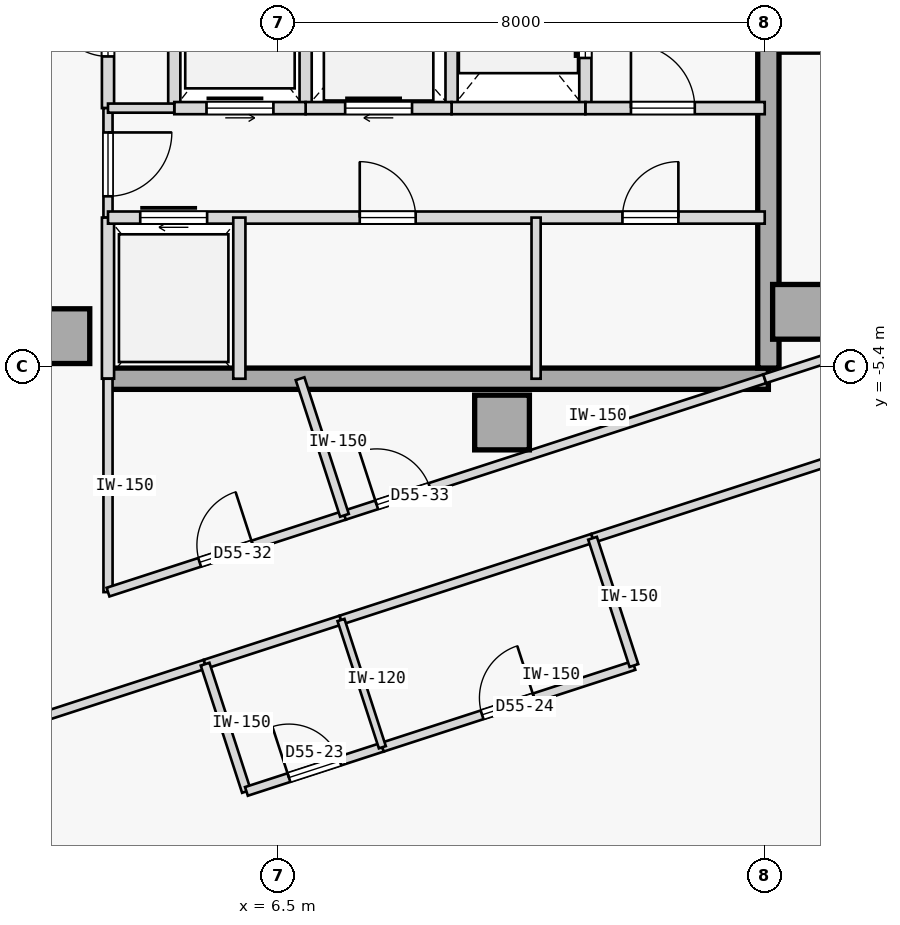
"""IFC4 building model, lengths in metres.
Left out: names, types, materials, properties, quantities, classifications, styles, units other than length and angle.
Written with IfcOpenShell. Run it as: python <this file> out.ifc"""

import sys

from ifc_helpers import new_model, si_unit, direction, frame, frame_2d, origin, origin_2d, place, context, subcontext, project, spatial, rectangle, extrude, element, fill, save


model = new_model("IFC4")
c1 = context("Model", 3, precision=1e-05, world=origin(), true_north=direction((0.0, 1.0)))
c2 = subcontext(c1, "Body", "Model", "MODEL_VIEW")
j1 = project(units=[si_unit("LENGTHUNIT", "METRE"), si_unit("PLANEANGLEUNIT", "RADIAN")], contexts=[c1])
p1 = place(None, origin())
s1 = spatial("IfcSite", under=j1, at=p1, CompositionType="ELEMENT")
p2 = place(p1, origin())
s2 = spatial("IfcBuilding", under=s1, at=p2, CompositionType="ELEMENT")
p3 = place(p2, frame((0.0, 0.0, 210.9)))
s3 = spatial("IfcBuildingStorey", under=s2, at=p3, CompositionType="ELEMENT", Elevation=210.9)
for number, where, z_axis, x_axis in (
    (1, (15.08, -4.5, 0.0), (0.0, 0.0, 1.0), (1.0, 0.0, 0.0)),
    (2, (10.18, -6.32, 0.0), (0.0, 0.0, 1.0), (1.0, 0.0, 0.0)),
    (3, (2.95, -4.9, 0.0), (0.0, 0.0, 1.0), (1.0, 0.0, 0.0)),
):
    element("IfcColumn", number, at=place(p3, frame(where, z_axis=z_axis, x_axis=x_axis)), inside=s3, PredefinedType="COLUMN", context=c2, shape_type="SweptSolid", body=[
        extrude(rectangle(XDim=0.9, YDim=0.9, at=origin_2d()), origin(), (0.0, 0.0, 1.0), 3.35),
    ])
p4 = place(p3, frame((3.7, -5.6, 0.0), z_axis=(0.0, 0.0, 1.0), x_axis=(1.0, 0.0, 0.0)))
e4 = element("IfcWall", 4, at=p4, inside=s3, PredefinedType="SHEAR", context=c2, shape_type="SweptSolid", body=[
    extrude(rectangle(XDim=10.86, YDim=0.35, at=frame_2d((5.43, 0.0))), origin(), (0.0, 0.0, 1.0), 3.125),
])
p5 = place(p3, frame((14.56, -5.425, 0.0), z_axis=(0.0, 0.0, 1.0), x_axis=(0.0, 1.0, 0.0)))
e5 = element("IfcWall", 5, at=p5, inside=s3, PredefinedType="SHEAR", context=c2, shape_type="SweptSolid", body=[
    extrude(rectangle(XDim=10.85, YDim=0.35, at=frame_2d((5.425, 0.0))), origin(), (0.0, 0.0, 1.0), 3.125),
])
p6 = place(p3, frame((3.7, -1.15, 0.0), z_axis=(0.0, 0.0, 1.0), x_axis=(0.0, 1.0, 0.0)))
e6 = element("IfcWall", 6, at=p6, inside=s3, PredefinedType="STANDARD", context=c2, shape_type="SweptSolid", body=[
    extrude(rectangle(XDim=6.75, YDim=0.2, at=frame_2d((3.375, 0.0))), origin(), (0.0, 0.0, 1.0), 3.125),
])
p7 = place(p6, frame((3.6, 0.0, 0.0)))
e7 = element("IfcOpeningElement", 7, at=p7, cuts=e6, PredefinedType="OPENING", context=c2, shape_type="SweptSolid", body=[
    extrude(rectangle(XDim=0.92, YDim=2.15, at=frame_2d((0.46, 1.075))), frame((0.0, 0.11, 0.0), z_axis=(0.0, -1.0, 0.0), x_axis=(1.0, 0.0, 0.0)), (0.0, 0.0, 1.0), 0.22),
])
p8 = place(p6, frame((0.85, 0.0, 0.0)))
e8 = element("IfcOpeningElement", 8, at=p8, cuts=e6, PredefinedType="OPENING", context=c2, shape_type="SweptSolid", body=[
    extrude(rectangle(XDim=0.9, YDim=2.15, at=frame_2d((0.45, 1.075))), frame((0.0, 0.11, 0.0), z_axis=(0.0, -1.0, 0.0), x_axis=(1.0, 0.0, 0.0)), (0.0, 0.0, 1.0), 0.22),
])
p9 = place(p3, frame((3.7, -2.95, 0.0), z_axis=(0.0, 0.0, 1.0), x_axis=(0.0, 1.0, 0.0)))
e9 = element("IfcWall", 9, at=p9, inside=s3, PredefinedType="PARTITIONING", context=c2, shape_type="SweptSolid", body=[
    extrude(rectangle(XDim=1.8, YDim=0.15, at=frame_2d((0.9, 0.0))), origin(), (0.0, 0.0, 1.0), 3.125),
])
p10 = place(p9, frame((0.35, 0.0, 0.0)))
e10 = element("IfcOpeningElement", 10, at=p10, cuts=e9, PredefinedType="OPENING", context=c2, shape_type="SweptSolid", body=[
    extrude(rectangle(XDim=1.05, YDim=2.18, at=frame_2d((0.525, 1.09))), frame((0.0, 0.085, 0.0), z_axis=(0.0, -1.0, 0.0), x_axis=(1.0, 0.0, 0.0)), (0.0, 0.0, 1.0), 0.17),
])
p11 = place(p3, frame((3.7, -5.6, 0.0), z_axis=(0.0, 0.0, 1.0), x_axis=(0.0, 1.0, 0.0)))
e11 = element("IfcWall", 11, at=p11, inside=s3, PredefinedType="STANDARD", context=c2, shape_type="SweptSolid", body=[
    extrude(rectangle(XDim=2.65, YDim=0.2, at=frame_2d((1.325, 0.0))), origin(), (0.0, 0.0, 1.0), 3.125),
])
p12 = place(p3, frame((11.55, -1.15, 0.0), z_axis=(0.0, 0.0, 1.0), x_axis=(0.0, 1.0, 0.0)))
e12 = element("IfcWall", 12, at=p12, inside=s3, PredefinedType="STANDARD", context=c2, shape_type="SweptSolid", body=[
    extrude(rectangle(XDim=2.75, YDim=0.2, at=frame_2d((1.375, 0.0))), origin(), (0.0, 0.0, 1.0), 3.125),
])
p13 = place(p12, frame((0.825, 0.0, 0.0)))
e13 = element("IfcOpeningElement", 13, at=p13, cuts=e12, PredefinedType="OPENING", context=c2, shape_type="SweptSolid", body=[
    extrude(rectangle(XDim=1.1, YDim=2.15, at=frame_2d((0.55, 1.075))), frame((0.0, 0.11, 0.0), z_axis=(0.0, -1.0, 0.0), x_axis=(1.0, 0.0, 0.0)), (0.0, 0.0, 1.0), 0.22),
])
p14 = place(p3, frame((9.35, -1.15, 0.0), z_axis=(0.0, 0.0, 1.0), x_axis=(0.0, 1.0, 0.0)))
e14 = element("IfcWall", 14, at=p14, inside=s3, PredefinedType="STANDARD", context=c2, shape_type="SweptSolid", body=[
    extrude(rectangle(XDim=2.75, YDim=0.2, at=frame_2d((1.375, 0.0))), origin(), (0.0, 0.0, 1.0), 3.125),
])
p15 = place(p3, frame((11.55, -1.15, 0.0), z_axis=(0.0, 0.0, 1.0), x_axis=(1.0, 0.0, 0.0)))
e15 = element("IfcWall", 15, at=p15, inside=s3, PredefinedType="STANDARD", context=c2, shape_type="SweptSolid", body=[
    extrude(rectangle(XDim=2.95, YDim=0.2, at=frame_2d((1.475, 0.0))), origin(), (0.0, 0.0, 1.0), 3.125),
])
p16 = place(p15, frame((0.75, 0.0, 0.0)))
e16 = element("IfcOpeningElement", 16, at=p16, cuts=e15, PredefinedType="OPENING", context=c2, shape_type="SweptSolid", body=[
    extrude(rectangle(XDim=1.05, YDim=2.18, at=frame_2d((0.525, 1.09))), frame((0.0, 0.11, 0.0), z_axis=(0.0, -1.0, 0.0), x_axis=(1.0, 0.0, 0.0)), (0.0, 0.0, 1.0), 0.22),
])
p17 = place(p3, frame((9.35, -1.15, 0.0), z_axis=(0.0, 0.0, 1.0), x_axis=(1.0, 0.0, 0.0)))
e17 = element("IfcWall", 17, at=p17, inside=s3, PredefinedType="STANDARD", context=c2, shape_type="SweptSolid", body=[
    extrude(rectangle(XDim=2.2, YDim=0.2, at=frame_2d((1.1, 0.0))), origin(), (0.0, 0.0, 1.0), 3.125),
])
p18 = place(p3, frame((6.95, -1.15, 0.0), z_axis=(0.0, 0.0, 1.0), x_axis=(0.0, 1.0, 0.0)))
e18 = element("IfcWall", 18, at=p18, inside=s3, PredefinedType="STANDARD", context=c2, shape_type="SweptSolid", body=[
    extrude(rectangle(XDim=2.75, YDim=0.2, at=frame_2d((1.375, 0.0))), origin(), (0.0, 0.0, 1.0), 3.125),
])
p19 = place(p3, frame((6.95, -1.15, 0.0), z_axis=(0.0, 0.0, 1.0), x_axis=(1.0, 0.0, 0.0)))
e19 = element("IfcWall", 19, at=p19, inside=s3, PredefinedType="STANDARD", context=c2, shape_type="SweptSolid", body=[
    extrude(rectangle(XDim=2.4, YDim=0.2, at=frame_2d((1.2, 0.0))), origin(), (0.0, 0.0, 1.0), 3.125),
])
p20 = place(p19, frame((0.65, 0.0, 0.0)))
e20 = element("IfcOpeningElement", 20, at=p20, cuts=e19, PredefinedType="OPENING", context=c2, shape_type="SweptSolid", body=[
    extrude(rectangle(XDim=1.1, YDim=2.15, at=frame_2d((0.55, 1.075))), frame((0.0, 0.11, 0.0), z_axis=(0.0, -1.0, 0.0), x_axis=(1.0, 0.0, 0.0)), (0.0, 0.0, 1.0), 0.22),
])
p21 = place(p3, frame((4.79, -1.15, 0.0), z_axis=(0.0, 0.0, 1.0), x_axis=(0.0, 1.0, 0.0)))
e21 = element("IfcWall", 21, at=p21, inside=s3, PredefinedType="STANDARD", context=c2, shape_type="SweptSolid", body=[
    extrude(rectangle(XDim=2.75, YDim=0.2, at=frame_2d((1.375, 0.0))), origin(), (0.0, 0.0, 1.0), 3.125),
])
p22 = place(p3, frame((4.79, -1.15, 0.0), z_axis=(0.0, 0.0, 1.0), x_axis=(1.0, 0.0, 0.0)))
e22 = element("IfcWall", 22, at=p22, inside=s3, PredefinedType="STANDARD", context=c2, shape_type="SweptSolid", body=[
    extrude(rectangle(XDim=2.16, YDim=0.2, at=frame_2d((1.08, 0.0))), origin(), (0.0, 0.0, 1.0), 3.125),
])
p23 = place(p22, frame((0.53, 0.0, 0.0)))
e23 = element("IfcOpeningElement", 23, at=p23, cuts=e22, PredefinedType="OPENING", context=c2, shape_type="SweptSolid", body=[
    extrude(rectangle(XDim=1.1, YDim=2.15, at=frame_2d((0.55, 1.075))), frame((0.0, 0.11, 0.0), z_axis=(0.0, -1.0, 0.0), x_axis=(1.0, 0.0, 0.0)), (0.0, 0.0, 1.0), 0.22),
])
p24 = place(p3, frame((3.7, -1.15, 0.0), z_axis=(0.0, 0.0, 1.0), x_axis=(1.0, 0.0, 0.0)))
e24 = element("IfcWall", 24, at=p24, inside=s3, PredefinedType="PARTITIONING", context=c2, shape_type="SweptSolid", body=[
    extrude(rectangle(XDim=1.09, YDim=0.15, at=frame_2d((0.545, 0.0))), origin(), (0.0, 0.0, 1.0), 3.125),
])
p25 = place(p3, frame((3.7, -2.95, 0.0), z_axis=(0.0, 0.0, 1.0), x_axis=(1.0, 0.0, 0.0)))
e25 = element("IfcWall", 25, at=p25, inside=s3, PredefinedType="STANDARD", context=c2, shape_type="SweptSolid", body=[
    extrude(rectangle(XDim=10.8, YDim=0.2, at=frame_2d((5.4, 0.0))), origin(), (0.0, 0.0, 1.0), 3.125),
])
p26 = place(p25, frame((0.53, 0.0, 0.0)))
e26 = element("IfcOpeningElement", 26, at=p26, cuts=e25, PredefinedType="OPENING", context=c2, shape_type="SweptSolid", body=[
    extrude(rectangle(XDim=1.1, YDim=2.15, at=frame_2d((0.55, 1.075))), frame((0.0, 0.11, 0.0), z_axis=(0.0, -1.0, 0.0), x_axis=(1.0, 0.0, 0.0)), (0.0, 0.0, 1.0), 0.22),
])
p27 = place(p25, frame((4.14, 0.0, 0.0)))
e27 = element("IfcOpeningElement", 27, at=p27, cuts=e25, PredefinedType="OPENING", context=c2, shape_type="SweptSolid", body=[
    extrude(rectangle(XDim=0.92, YDim=2.15, at=frame_2d((0.46, 1.075))), frame((0.0, 0.11, 0.0), z_axis=(0.0, -1.0, 0.0), x_axis=(1.0, 0.0, 0.0)), (0.0, 0.0, 1.0), 0.22),
])
p28 = place(p25, frame((8.46, 0.0, 0.0)))
e28 = element("IfcOpeningElement", 28, at=p28, cuts=e25, PredefinedType="OPENING", context=c2, shape_type="SweptSolid", body=[
    extrude(rectangle(XDim=0.92, YDim=2.15, at=frame_2d((0.46, 1.075))), frame((0.0, 0.11, 0.0), z_axis=(0.0, -1.0, 0.0), x_axis=(1.0, 0.0, 0.0)), (0.0, 0.0, 1.0), 0.22),
])
p29 = place(p3, frame((5.86, -5.6, 0.0), z_axis=(0.0, 0.0, 1.0), x_axis=(0.0, 1.0, 0.0)))
e29 = element("IfcWall", 29, at=p29, inside=s3, PredefinedType="STANDARD", context=c2, shape_type="SweptSolid", body=[
    extrude(rectangle(XDim=2.65, YDim=0.2, at=frame_2d((1.325, 0.0))), origin(), (0.0, 0.0, 1.0), 3.125),
])
p30 = place(p3, frame((10.74, -5.6, 0.0), z_axis=(0.0, 0.0, 1.0), x_axis=(0.0, 1.0, 0.0)))
e30 = element("IfcWall", 30, at=p30, inside=s3, PredefinedType="PARTITIONING", context=c2, shape_type="SweptSolid", body=[
    extrude(rectangle(XDim=2.65, YDim=0.15, at=frame_2d((1.325, 0.0))), origin(), (0.0, 0.0, 1.0), 3.125),
])
p31 = place(p3, frame((-1.643, -12.549, 0.0), z_axis=(0.0, 0.0, 1.0), x_axis=(0.951058161173, 0.309011931914, 0.0)))
e31 = element("IfcWall", 31, at=p31, inside=s3, PredefinedType="PARTITIONING", context=c2, shape_type="SweptSolid", body=[
    extrude(rectangle(XDim=7.297, YDim=0.15, at=frame_2d((3.648, 0.0))), origin(), (0.0, 0.0, 1.0), 3.125),
])
p32 = place(p3, frame((11.669, -8.223, 0.0), z_axis=(0.0, 0.0, 1.0), x_axis=(0.951057967787, 0.309012527106, 0.0)))
e32 = element("IfcWall", 32, at=p32, inside=s3, PredefinedType="PARTITIONING", context=c2, shape_type="SweptSolid", body=[
    extrude(rectangle(XDim=19.291, YDim=0.15, at=frame_2d((9.646, 0.0))), origin(), (0.0, 0.0, 1.0), 3.125),
])
p33 = place(p32, frame((9.17, 0.0, 0.0)))
e33 = element("IfcOpeningElement", 33, at=p33, cuts=e32, PredefinedType="OPENING", context=c2, shape_type="SweptSolid", body=[
    extrude(rectangle(XDim=0.95, YDim=2.15, at=frame_2d((0.475, 1.075))), frame((0.0, 0.085, 0.0), z_axis=(0.0, -1.0, 0.0), x_axis=(1.0, 0.0, 0.0)), (0.0, 0.0, 1.0), 0.17),
])
p34 = place(p3, frame((5.297, -10.294, 0.0), z_axis=(0.0, 0.0, 1.0), x_axis=(0.951066131077, 0.308987401554, 0.0)))
e34 = element("IfcWall", 34, at=p34, inside=s3, PredefinedType="PARTITIONING", context=c2, shape_type="SweptSolid", body=[
    extrude(rectangle(XDim=2.35, YDim=0.15, at=frame_2d((1.175, 0.0))), origin(), (0.0, 0.0, 1.0), 3.125),
])
p35 = place(p3, frame((7.531, -9.568, 0.0), z_axis=(0.0, 0.0, 1.0), x_axis=(0.951041492154, 0.309063230101, 0.0)))
e35 = element("IfcWall", 35, at=p35, inside=s3, PredefinedType="PARTITIONING", context=c2, shape_type="SweptSolid", body=[
    extrude(rectangle(XDim=4.35, YDim=0.15, at=frame_2d((2.175, 0.0))), origin(), (0.0, 0.0, 1.0), 3.125),
])
p36 = place(p3, frame((3.7, -9.109, 0.0), z_axis=(0.0, 0.0, 1.0), x_axis=(-0.000139130433, 0.999999990321, 0.0)))
e36 = element("IfcWall", 36, at=p36, inside=s3, PredefinedType="PARTITIONING", context=c2, shape_type="SweptSolid", body=[
    extrude(rectangle(XDim=3.51, YDim=0.15, at=frame_2d((1.755, 0.0))), origin(), (0.0, 0.0, 1.0), 3.125),
])
p37 = place(p3, frame((3.7, -9.109, 0.0), z_axis=(0.0, 0.0, 1.0), x_axis=(0.95106259184, 0.308998295145, 0.0)))
e37 = element("IfcWall", 37, at=p37, inside=s3, PredefinedType="PARTITIONING", context=c2, shape_type="SweptSolid", body=[
    extrude(rectangle(XDim=4.088, YDim=0.15, at=frame_2d((2.044, 0.0))), origin(), (0.0, 0.0, 1.0), 3.125),
])
p38 = place(p37, frame((1.584, 0.0, 0.0)))
e38 = element("IfcOpeningElement", 38, at=p38, cuts=e37, PredefinedType="OPENING", context=c2, shape_type="SweptSolid", body=[
    extrude(rectangle(XDim=0.92, YDim=2.15, at=frame_2d((0.46, 1.075))), frame((0.0, 0.085, 0.0), z_axis=(0.0, -1.0, 0.0), x_axis=(1.0, 0.0, 0.0)), (0.0, 0.0, 1.0), 0.17),
])
p39 = place(p3, frame((7.588, -7.846, 0.0), z_axis=(0.0, 0.0, 1.0), x_axis=(0.951058013903, 0.309012385174, 0.0)))
e39 = element("IfcWall", 39, at=p39, inside=s3, PredefinedType="PARTITIONING", context=c2, shape_type="SweptSolid", body=[
    extrude(rectangle(XDim=7.267, YDim=0.15, at=frame_2d((3.634, 0.0))), origin(), (0.0, 0.0, 1.0), 3.125),
])
p40 = place(p39, frame((0.557, 0.0, 0.0)))
e40 = element("IfcOpeningElement", 40, at=p40, cuts=e39, PredefinedType="OPENING", context=c2, shape_type="SweptSolid", body=[
    extrude(rectangle(XDim=0.92, YDim=2.15, at=frame_2d((0.46, 1.075))), frame((0.0, 0.085, 0.0), z_axis=(0.0, -1.0, 0.0), x_axis=(1.0, 0.0, 0.0)), (0.0, 0.0, 1.0), 0.17),
])
p41 = place(p3, frame((14.5, -5.6, 0.0), z_axis=(0.0, 0.0, 1.0), x_axis=(0.951047546178, 0.309044600193, 0.0)))
e41 = element("IfcWall", 41, at=p41, inside=s3, PredefinedType="PARTITIONING", context=c2, shape_type="SweptSolid", body=[
    extrude(rectangle(XDim=3.461, YDim=0.15, at=frame_2d((1.73, 0.0))), origin(), (0.0, 0.0, 1.0), 3.125),
])
p42 = place(p41, frame((1.79, 0.0, 0.0)))
e42 = element("IfcOpeningElement", 42, at=p42, cuts=e41, PredefinedType="OPENING", context=c2, shape_type="SweptSolid", body=[
    extrude(rectangle(XDim=0.92, YDim=2.15, at=frame_2d((0.46, 1.075))), frame((0.0, 0.085, 0.0), z_axis=(0.0, -1.0, 0.0), x_axis=(1.0, 0.0, 0.0)), (0.0, 0.0, 1.0), 0.17),
])
p43 = place(p3, frame((5.977, -12.386, 0.0), z_axis=(0.0, 0.0, 1.0), x_axis=(-0.309060979314, 0.951042223598, 0.0)))
e43 = element("IfcWall", 43, at=p43, inside=s3, PredefinedType="PARTITIONING", context=c2, shape_type="SweptSolid", body=[
    extrude(rectangle(XDim=2.2, YDim=0.15, at=frame_2d((1.1, 0.0))), origin(), (0.0, 0.0, 1.0), 3.125),
])
p44 = place(p3, frame((5.977, -12.386, 0.0), z_axis=(0.0, 0.0, 1.0), x_axis=(0.951066131077, 0.308987401554, 0.0)))
e44 = element("IfcWall", 44, at=p44, inside=s3, PredefinedType="PARTITIONING", context=c2, shape_type="SweptSolid", body=[
    extrude(rectangle(XDim=2.35, YDim=0.15, at=frame_2d((1.175, 0.0))), origin(), (0.0, 0.0, 1.0), 3.125),
])
p45 = place(p44, frame((0.735, 0.0, 0.0)))
e45 = element("IfcOpeningElement", 45, at=p45, cuts=e44, PredefinedType="OPENING", context=c2, shape_type="SweptSolid", body=[
    extrude(rectangle(XDim=0.88, YDim=2.15, at=frame_2d((0.44, 1.075))), frame((0.0, 0.085, 0.0), z_axis=(0.0, -1.0, 0.0), x_axis=(1.0, 0.0, 0.0)), (0.0, 0.0, 1.0), 0.17),
])
p46 = place(p3, frame((8.211, -11.66, 0.0), z_axis=(0.0, 0.0, 1.0), x_axis=(0.951057987102, 0.309012467661, 0.0)))
e46 = element("IfcWall", 46, at=p46, inside=s3, PredefinedType="PARTITIONING", context=c2, shape_type="SweptSolid", body=[
    extrude(rectangle(XDim=4.35, YDim=0.15, at=frame_2d((2.175, 0.0))), origin(), (0.0, 0.0, 1.0), 3.125),
])
p47 = place(p46, frame((1.725, 0.0, 0.0)))
e47 = element("IfcOpeningElement", 47, at=p47, cuts=e46, PredefinedType="OPENING", context=c2, shape_type="SweptSolid", body=[
    extrude(rectangle(XDim=0.9, YDim=2.15, at=frame_2d((0.45, 1.075))), frame((0.0, 0.085, 0.0), z_axis=(0.0, -1.0, 0.0), x_axis=(1.0, 0.0, 0.0)), (0.0, 0.0, 1.0), 0.17),
])
p48 = place(p3, frame((12.349, -10.316, 0.0), z_axis=(0.0, 0.0, 1.0), x_axis=(-0.309028364152, 0.951052821956, 0.0)))
e48 = element("IfcWall", 48, at=p48, inside=s3, PredefinedType="PARTITIONING", context=c2, shape_type="SweptSolid", body=[
    extrude(rectangle(XDim=2.2, YDim=0.15, at=frame_2d((1.1, 0.0))), origin(), (0.0, 0.0, 1.0), 3.125),
])
p49 = place(p3, frame((8.211, -11.66, 0.0), z_axis=(0.0, 0.0, 1.0), x_axis=(-0.309060979314, 0.951042223598, 0.0)))
e49 = element("IfcWall", 49, at=p49, inside=s3, PredefinedType="PARTITIONING", context=c2, shape_type="SweptSolid", body=[
    extrude(rectangle(XDim=2.2, YDim=0.12, at=frame_2d((1.1, 0.0))), origin(), (0.0, 0.0, 1.0), 3.125),
])
p50 = place(p3, frame((7.588, -7.846, 0.0), z_axis=(0.0, 0.0, 1.0), x_axis=(-0.309055688452, 0.951043942957, 0.0)))
e50 = element("IfcWall", 50, at=p50, inside=s3, PredefinedType="PARTITIONING", context=c2, shape_type="SweptSolid", body=[
    extrude(rectangle(XDim=2.362, YDim=0.15, at=frame_2d((1.181, 0.0))), origin(), (0.0, 0.0, 1.0), 3.125),
])
p51 = place(p16, origin())
e51 = element("IfcDoor", 51, at=p51, inside=s3, OperationType="SINGLE_SWING_LEFT", PredefinedType="DOOR", context=c2, shape_type="SweptSolid", body=[
    extrude(rectangle(XDim=1.05, YDim=2.18, at=frame_2d((0.525, 1.09))), frame((0.0, 0.025, 0.0), z_axis=(0.0, -1.0, 0.0), x_axis=(1.0, 0.0, 0.0)), (0.0, 0.0, 1.0), 0.05),
])
fill(e16, e51)
p52 = place(p10, frame((1.05, 0.0, 0.0), z_axis=(0.0, 0.0, 1.0), x_axis=(-1.0, 0.0, 0.0)))
e52 = element("IfcDoor", 52, at=p52, inside=s3, OperationType="SINGLE_SWING_RIGHT", PredefinedType="DOOR", context=c2, shape_type="SweptSolid", body=[
    extrude(rectangle(XDim=1.05, YDim=2.18, at=frame_2d((0.525, 1.09))), frame((0.0, 0.025, 0.0), z_axis=(0.0, -1.0, 0.0), x_axis=(1.0, 0.0, 0.0)), (0.0, 0.0, 1.0), 0.05),
])
fill(e10, e52)
p53 = place(p13, origin())
e53 = element("IfcDoor", 53, at=p53, inside=s3, OperationType="SLIDING_TO_RIGHT", PredefinedType="DOOR", context=c2, shape_type="SweptSolid", body=[
    extrude(rectangle(XDim=1.1, YDim=2.15, at=frame_2d((0.55, 1.075))), frame((0.0, 0.025, 0.0), z_axis=(0.0, -1.0, 0.0), x_axis=(1.0, 0.0, 0.0)), (0.0, 0.0, 1.0), 0.05),
])
fill(e13, e53)
p54 = place(p20, origin())
e54 = element("IfcDoor", 54, at=p54, inside=s3, OperationType="SLIDING_TO_RIGHT", PredefinedType="DOOR", context=c2, shape_type="SweptSolid", body=[
    extrude(rectangle(XDim=1.1, YDim=2.15, at=frame_2d((0.55, 1.075))), frame((0.0, 0.025, 0.0), z_axis=(0.0, -1.0, 0.0), x_axis=(1.0, 0.0, 0.0)), (0.0, 0.0, 1.0), 0.05),
])
fill(e20, e54)
p55 = place(p23, origin())
e55 = element("IfcDoor", 55, at=p55, inside=s3, OperationType="SLIDING_TO_LEFT", PredefinedType="DOOR", context=c2, shape_type="SweptSolid", body=[
    extrude(rectangle(XDim=1.1, YDim=2.15, at=frame_2d((0.55, 1.075))), frame((0.0, 0.025, 0.0), z_axis=(0.0, -1.0, 0.0), x_axis=(1.0, 0.0, 0.0)), (0.0, 0.0, 1.0), 0.05),
])
fill(e23, e55)
p56 = place(p26, origin())
e56 = element("IfcDoor", 56, at=p56, inside=s3, OperationType="SLIDING_TO_RIGHT", PredefinedType="DOOR", context=c2, shape_type="SweptSolid", body=[
    extrude(rectangle(XDim=1.1, YDim=2.15, at=frame_2d((0.55, 1.075))), frame((0.0, 0.025, 0.0), z_axis=(0.0, -1.0, 0.0), x_axis=(1.0, 0.0, 0.0)), (0.0, 0.0, 1.0), 0.05),
])
fill(e26, e56)
p57 = place(p27, origin())
e57 = element("IfcDoor", 57, at=p57, inside=s3, OperationType="SINGLE_SWING_LEFT", PredefinedType="DOOR", context=c2, shape_type="SweptSolid", body=[
    extrude(rectangle(XDim=0.92, YDim=2.15, at=frame_2d((0.46, 1.075))), frame((0.0, 0.025, 0.0), z_axis=(0.0, -1.0, 0.0), x_axis=(1.0, 0.0, 0.0)), (0.0, 0.0, 1.0), 0.05),
])
fill(e27, e57)
p58 = place(p28, origin())
e58 = element("IfcDoor", 58, at=p58, inside=s3, OperationType="SINGLE_SWING_RIGHT", PredefinedType="DOOR", context=c2, shape_type="SweptSolid", body=[
    extrude(rectangle(XDim=0.92, YDim=2.15, at=frame_2d((0.46, 1.075))), frame((0.0, 0.025, 0.0), z_axis=(0.0, -1.0, 0.0), x_axis=(1.0, 0.0, 0.0)), (0.0, 0.0, 1.0), 0.05),
])
fill(e28, e58)
p59 = place(p8, origin())
e59 = element("IfcDoor", 59, at=p59, inside=s3, OperationType="SINGLE_SWING_RIGHT", PredefinedType="DOOR", context=c2, shape_type="SweptSolid", body=[
    extrude(rectangle(XDim=0.9, YDim=2.15, at=frame_2d((0.45, 1.075))), frame((0.0, 0.025, 0.0), z_axis=(0.0, -1.0, 0.0), x_axis=(1.0, 0.0, 0.0)), (0.0, 0.0, 1.0), 0.05),
])
fill(e8, e59)
p60 = place(p45, origin())
e60 = element("IfcDoor", 60, at=p60, inside=s3, OperationType="SINGLE_SWING_LEFT", PredefinedType="DOOR", context=c2, shape_type="SweptSolid", body=[
    extrude(rectangle(XDim=0.88, YDim=2.15, at=frame_2d((0.44, 1.075))), frame((0.0, 0.025, 0.0), z_axis=(0.0, -1.0, 0.0), x_axis=(1.0, 0.0, 0.0)), (0.0, 0.0, 1.0), 0.05),
])
fill(e45, e60)
p61 = place(p47, origin())
e61 = element("IfcDoor", 61, at=p61, inside=s3, OperationType="SINGLE_SWING_RIGHT", PredefinedType="DOOR", context=c2, shape_type="SweptSolid", body=[
    extrude(rectangle(XDim=0.9, YDim=2.15, at=frame_2d((0.45, 1.075))), frame((0.0, 0.025, 0.0), z_axis=(0.0, -1.0, 0.0), x_axis=(1.0, 0.0, 0.0)), (0.0, 0.0, 1.0), 0.05),
])
fill(e47, e61)
p62 = place(p38, origin())
e62 = element("IfcDoor", 62, at=p62, inside=s3, OperationType="SINGLE_SWING_RIGHT", PredefinedType="DOOR", context=c2, shape_type="SweptSolid", body=[
    extrude(rectangle(XDim=0.92, YDim=2.15, at=frame_2d((0.46, 1.075))), frame((0.0, 0.025, 0.0), z_axis=(0.0, -1.0, 0.0), x_axis=(1.0, 0.0, 0.0)), (0.0, 0.0, 1.0), 0.05),
])
fill(e38, e62)
p63 = place(p40, origin())
e63 = element("IfcDoor", 63, at=p63, inside=s3, OperationType="SINGLE_SWING_LEFT", PredefinedType="DOOR", context=c2, shape_type="SweptSolid", body=[
    extrude(rectangle(XDim=0.92, YDim=2.15, at=frame_2d((0.46, 1.075))), frame((0.0, 0.025, 0.0), z_axis=(0.0, -1.0, 0.0), x_axis=(1.0, 0.0, 0.0)), (0.0, 0.0, 1.0), 0.05),
])
fill(e40, e63)
save(model, sys.argv[1])
